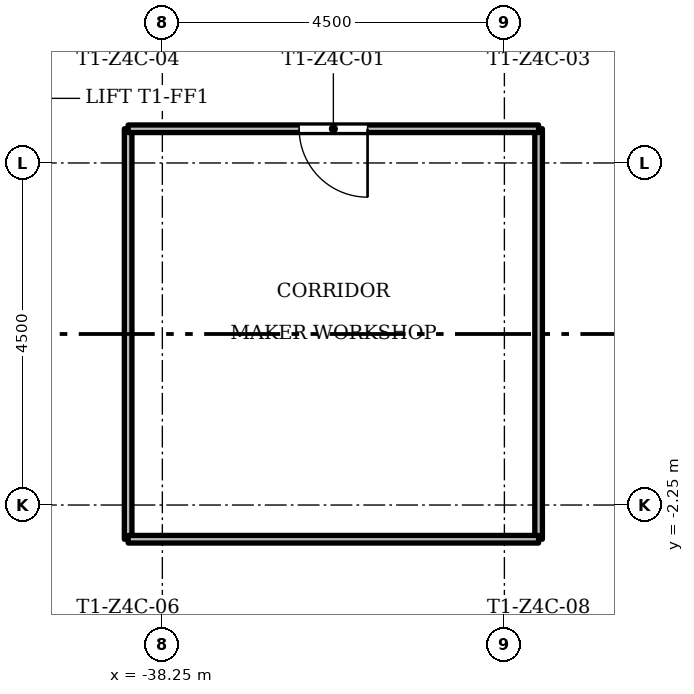
"""IFC4 building model, lengths in metres.
Left out: names, types, materials, properties, quantities, classifications, styles, units other than length and angle.
Written with IfcOpenShell. Run it as: python <this file> out.ifc"""

import sys

from ifc_helpers import new_model, si_unit, direction, frame, frame_2d, origin, place, context, subcontext, project, spatial, rectangle, extrude, element, fill, save


model = new_model("IFC4")
c1 = context("Model", 3, precision=1e-05, world=origin(), true_north=direction((0.0, 1.0)))
c2 = subcontext(c1, "Body", "Model", "MODEL_VIEW")
j1 = project(units=[si_unit("LENGTHUNIT", "METRE"), si_unit("PLANEANGLEUNIT", "RADIAN")], contexts=[c1])
p1 = place(None, origin())
s1 = spatial("IfcSite", under=j1, at=p1, CompositionType="ELEMENT")
p2 = place(p1, origin())
s2 = spatial("IfcBuilding", under=s1, at=p2, CompositionType="ELEMENT")
p3 = place(p2, frame((0.0, 0.0, 189.2)))
s3 = spatial("IfcBuildingStorey", under=s2, at=p3, CompositionType="ELEMENT", Elevation=189.2)
for number, where, z_axis, x_axis in (
    (1, (-38.7, -2.7, 0.0), (0.0, 0.0, 1.0), (0.0, 1.0, 0.0)),
    (2, (-33.3, -2.7, 0.0), (0.0, 0.0, 1.0), (0.0, 1.0, 0.0)),
    (3, (-38.7, -2.7, 0.0), (0.0, 0.0, 1.0), (1.0, 0.0, 0.0)),
):
    element("IfcWall", number, at=place(p3, frame(where, z_axis=z_axis, x_axis=x_axis)), inside=s3, PredefinedType="PARTITIONING", context=c2, shape_type="SweptSolid", body=[
        extrude(rectangle(XDim=5.4, YDim=0.1, at=frame_2d((2.7, 0.0))), origin(), (0.0, 0.0, 1.0), 3.0),
    ])
p4 = place(p3, frame((-38.7, 2.7, 0.0), z_axis=(0.0, 0.0, 1.0), x_axis=(1.0, 0.0, 0.0)))
e4 = element("IfcWall", 4, at=p4, inside=s3, PredefinedType="PARTITIONING", context=c2, shape_type="SweptSolid", body=[
    extrude(rectangle(XDim=5.4, YDim=0.1, at=frame_2d((2.7, 0.0))), origin(), (0.0, 0.0, 1.0), 3.0),
])
p5 = place(p4, frame((2.25, 0.0, 0.0)))
e5 = element("IfcOpeningElement", 5, at=p5, cuts=e4, PredefinedType="OPENING", context=c2, shape_type="SweptSolid", body=[
    extrude(rectangle(XDim=0.9, YDim=2.1, at=frame_2d((0.45, 1.05))), frame((0.0, 0.06, 0.0), z_axis=(0.0, -1.0, 0.0), x_axis=(1.0, 0.0, 0.0)), (0.0, 0.0, 1.0), 0.12),
])
p6 = place(p5, origin())
e6 = element("IfcDoor", 6, at=p6, inside=s3, OperationType="SINGLE_SWING_RIGHT", PredefinedType="DOOR", context=c2, shape_type="SweptSolid", body=[
    extrude(rectangle(XDim=0.9, YDim=2.1, at=frame_2d((0.45, 1.05))), frame((0.0, 0.025, 0.0), z_axis=(0.0, -1.0, 0.0), x_axis=(1.0, 0.0, 0.0)), (0.0, 0.0, 1.0), 0.05),
])
fill(e5, e6)
save(model, sys.argv[1])
